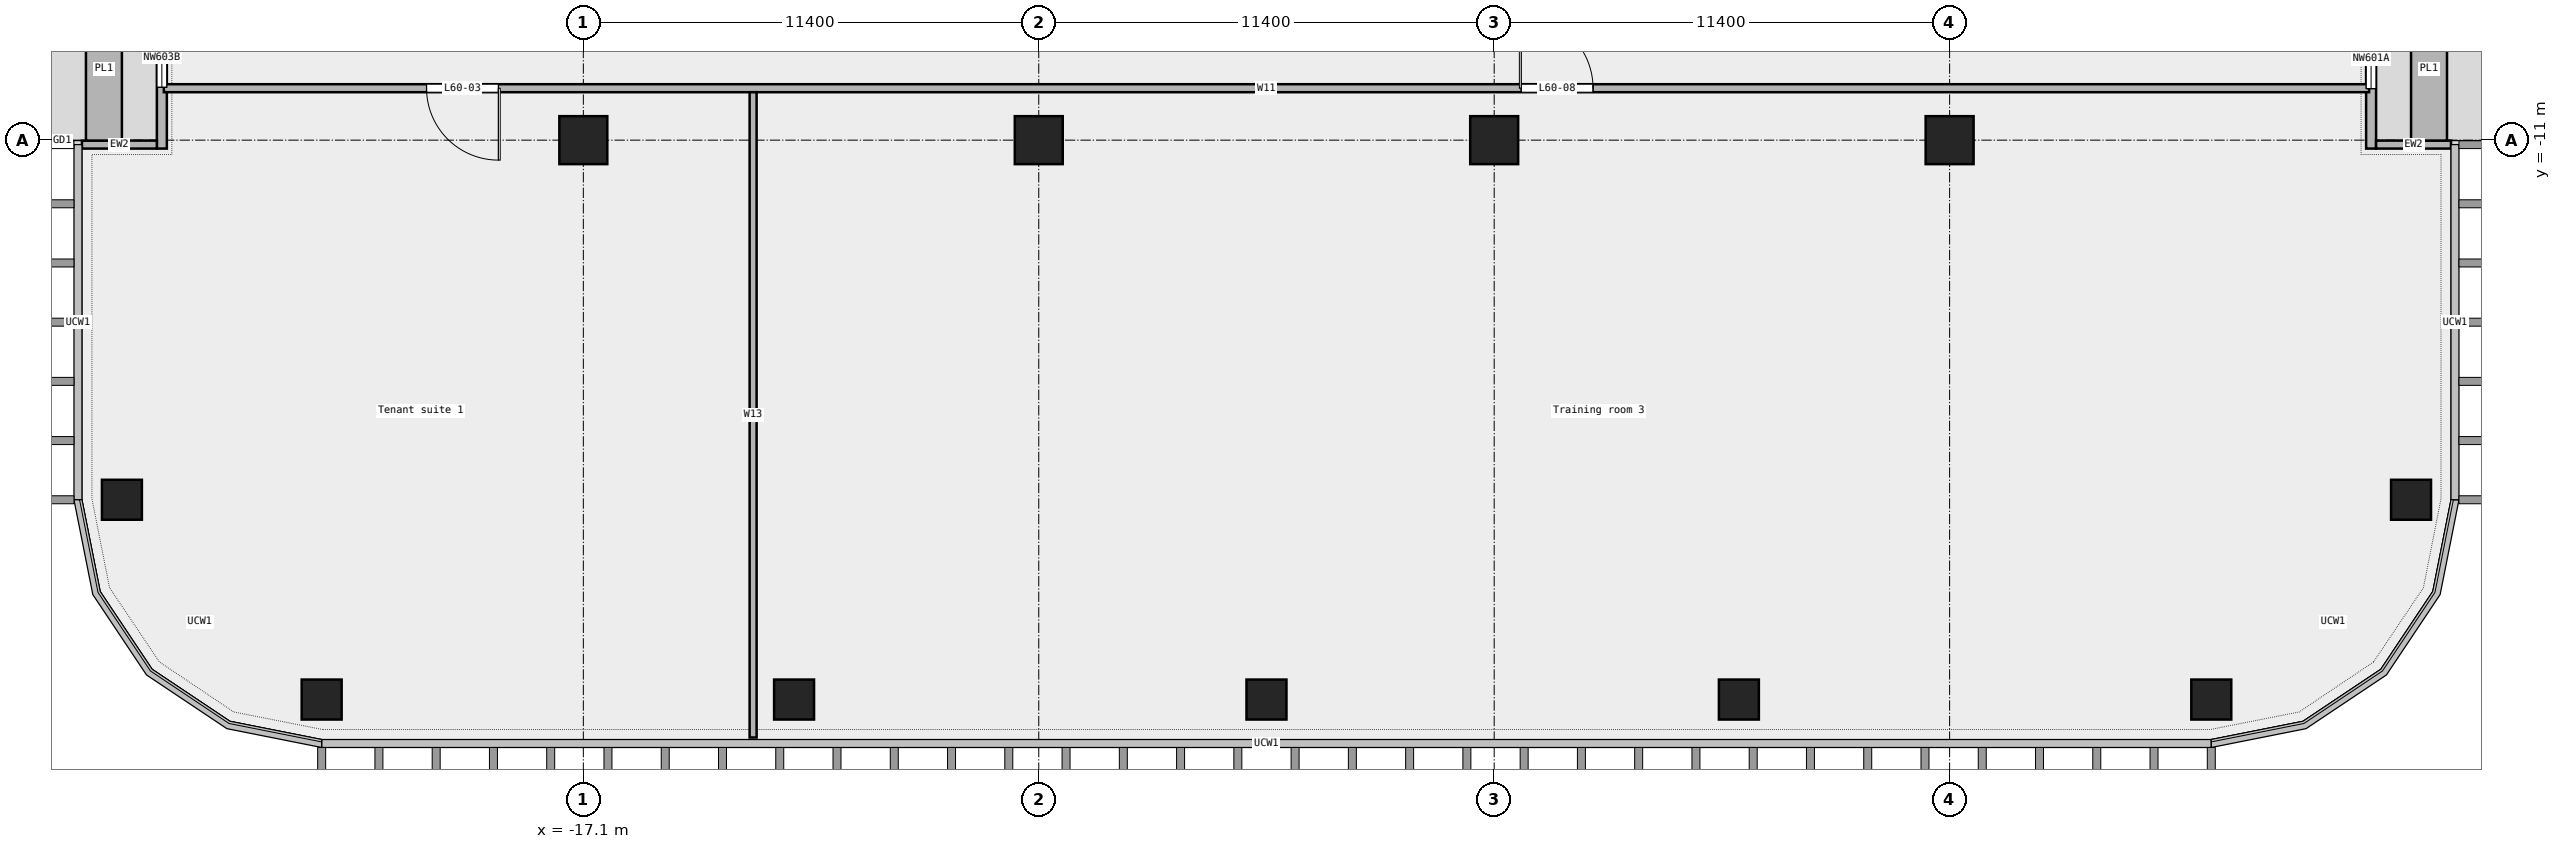
"""IFC4 building model, lengths in metres.
Left out: names, types, materials, properties, quantities, classifications, styles, units other than length and angle.
Written with IfcOpenShell. Run it as: python <this file> out.ifc"""

import sys

from ifc_helpers import new_model, si_unit, direction, frame, frame_2d, origin, origin_2d, place, context, subcontext, project, spatial, rectangle, extrude, element, fill, save


model = new_model("IFC4")
c1 = context("Model", 3, precision=1e-05, world=origin(), true_north=direction((0.0, 1.0)))
c2 = subcontext(c1, "Body", "Model", "MODEL_VIEW")
j1 = project(units=[si_unit("LENGTHUNIT", "METRE"), si_unit("PLANEANGLEUNIT", "RADIAN")], contexts=[c1])
p1 = place(None, origin())
s1 = spatial("IfcSite", under=j1, at=p1, CompositionType="ELEMENT")
p2 = place(p1, origin())
s2 = spatial("IfcBuilding", under=s1, at=p2, CompositionType="ELEMENT")
p3 = place(p2, frame((0.0, 0.0, 279.4)))
s3 = spatial("IfcBuildingStorey", under=s2, at=p3, CompositionType="ELEMENT", Elevation=279.4)
for number, where, z_axis, x_axis in (
    (1, (-23.65, -25.0, 0.0), (0.0, 0.0, 1.0), (1.0, 0.0, 0.0)),
    (2, (-11.825, -25.0, 0.0), (0.0, 0.0, 1.0), (1.0, 0.0, 0.0)),
    (3, (0.0, -25.0, 0.0), (0.0, 0.0, 1.0), (1.0, 0.0, 0.0)),
    (4, (11.825, -25.0, 0.0), (0.0, 0.0, 1.0), (1.0, 0.0, 0.0)),
    (5, (23.65, -25.0, 0.0), (0.0, 0.0, 1.0), (1.0, 0.0, 0.0)),
    (6, (28.65, -20.0, 0.0), (0.0, 0.0, 1.0), (1.0, 0.0, 0.0)),
    (7, (-28.65, -20.0, 0.0), (0.0, 0.0, 1.0), (1.0, 0.0, 0.0)),
):
    element("IfcColumn", number, at=place(p3, frame(where, z_axis=z_axis, x_axis=x_axis)), inside=s3, PredefinedType="COLUMN", context=c2, shape_type="SweptSolid", body=[
        extrude(rectangle(XDim=1.0, YDim=1.0, at=origin_2d()), origin(), (0.0, 0.0, 1.0), 3.6),
    ])
for number, where, z_axis, x_axis in (
    (8, (-17.1, -11.0, 0.0), (0.0, 0.0, 1.0), (1.0, 0.0, 0.0)),
    (9, (-5.7, -11.0, 0.0), (0.0, 0.0, 1.0), (1.0, 0.0, 0.0)),
    (10, (5.7, -11.0, 0.0), (0.0, 0.0, 1.0), (1.0, 0.0, 0.0)),
    (11, (17.1, -11.0, 0.0), (0.0, 0.0, 1.0), (1.0, 0.0, 0.0)),
):
    element("IfcColumn", number, at=place(p3, frame(where, z_axis=z_axis, x_axis=x_axis)), inside=s3, PredefinedType="COLUMN", context=c2, shape_type="SweptSolid", body=[
        extrude(rectangle(XDim=1.2, YDim=1.2, at=origin_2d()), origin(), (0.0, 0.0, 1.0), 3.6),
    ])
p4 = place(p3, frame((27.65, -11.211, 0.0), z_axis=(0.0, 0.0, 1.0), x_axis=(0.0, 1.0, 0.0)))
e12 = element("IfcWall", 12, at=p4, inside=s3, PredefinedType="STANDARD", context=c2, shape_type="SweptSolid", body=[
    extrude(rectangle(XDim=13.533, YDim=0.25, at=frame_2d((6.767, 0.0))), origin(), (0.0, 0.0, 1.0), 3.6),
])
p5 = place(p4, frame((1.5, 0.0, 0.45)))
e13 = element("IfcOpeningElement", 13, at=p5, cuts=e12, PredefinedType="OPENING", context=c2, shape_type="SweptSolid", body=[
    extrude(rectangle(XDim=1.5, YDim=2.4, at=frame_2d((0.75, 1.2))), frame((0.0, 0.137, 0.0), z_axis=(0.0, -1.0, 0.0), x_axis=(1.0, 0.0, 0.0)), (0.0, 0.0, 1.0), 0.274),
])
p6 = place(p4, frame((5.75, 0.0, 0.0)))
e14 = element("IfcOpeningElement", 14, at=p6, cuts=e12, PredefinedType="OPENING", context=c2, shape_type="SweptSolid", body=[
    extrude(rectangle(XDim=1.8, YDim=2.4, at=frame_2d((0.9, 1.2))), frame((0.0, 0.137, 0.0), z_axis=(0.0, -1.0, 0.0), x_axis=(1.0, 0.0, 0.0)), (0.0, 0.0, 1.0), 0.274),
])
p7 = place(p4, frame((10.5, 0.0, 0.45)))
e15 = element("IfcOpeningElement", 15, at=p7, cuts=e12, PredefinedType="OPENING", context=c2, shape_type="SweptSolid", body=[
    extrude(rectangle(XDim=1.5, YDim=2.4, at=frame_2d((0.75, 1.2))), frame((0.0, 0.137, 0.0), z_axis=(0.0, -1.0, 0.0), x_axis=(1.0, 0.0, 0.0)), (0.0, 0.0, 1.0), 0.274),
])
p8 = place(p3, frame((29.65, -11.111, 0.0), z_axis=(0.0, 0.0, 1.0), x_axis=(-1.0, 0.0, 0.0)))
e16 = element("IfcWall", 16, at=p8, inside=s3, PredefinedType="STANDARD", context=c2, shape_type="SweptSolid", body=[
    extrude(rectangle(XDim=1.875, YDim=0.2, at=frame_2d((0.938, 0.0))), origin(), (0.0, 0.0, 1.0), 3.6),
])
p9 = place(p3, frame((29.1, -11.011, 0.0), z_axis=(0.0, 0.0, 1.0), x_axis=(0.0, 1.0, 0.0)))
e17 = element("IfcWall", 17, at=p9, inside=s3, PredefinedType="STANDARD", context=c2, shape_type="SweptSolid", body=[
    extrude(rectangle(XDim=3.6, YDim=0.9, at=frame_2d((1.8, 0.0))), origin(), (0.0, 0.0, 1.0), 0.7),
])
p10 = place(p3, frame((-27.65, 2.322, 0.0), z_axis=(0.0, 0.0, 1.0), x_axis=(0.0, -1.0, 0.0)))
e18 = element("IfcWall", 18, at=p10, inside=s3, PredefinedType="STANDARD", context=c2, shape_type="SweptSolid", body=[
    extrude(rectangle(XDim=13.533, YDim=0.25, at=frame_2d((6.767, 0.0))), origin(), (0.0, 0.0, 1.0), 3.6),
])
p11 = place(p10, frame((1.5, 0.0, 0.45)))
e19 = element("IfcOpeningElement", 19, at=p11, cuts=e18, PredefinedType="OPENING", context=c2, shape_type="SweptSolid", body=[
    extrude(rectangle(XDim=1.5, YDim=2.4, at=frame_2d((0.75, 1.2))), frame((0.0, 0.137, 0.0), z_axis=(0.0, -1.0, 0.0), x_axis=(1.0, 0.0, 0.0)), (0.0, 0.0, 1.0), 0.274),
])
p12 = place(p10, frame((5.75, 0.0, 0.0)))
e20 = element("IfcOpeningElement", 20, at=p12, cuts=e18, PredefinedType="OPENING", context=c2, shape_type="SweptSolid", body=[
    extrude(rectangle(XDim=1.8, YDim=2.4, at=frame_2d((0.9, 1.2))), frame((0.0, 0.137, 0.0), z_axis=(0.0, -1.0, 0.0), x_axis=(1.0, 0.0, 0.0)), (0.0, 0.0, 1.0), 0.274),
])
p13 = place(p10, frame((10.5, 0.0, 0.45)))
e21 = element("IfcOpeningElement", 21, at=p13, cuts=e18, PredefinedType="OPENING", context=c2, shape_type="SweptSolid", body=[
    extrude(rectangle(XDim=1.5, YDim=2.4, at=frame_2d((0.75, 1.2))), frame((0.0, 0.137, 0.0), z_axis=(0.0, -1.0, 0.0), x_axis=(1.0, 0.0, 0.0)), (0.0, 0.0, 1.0), 0.274),
])
p14 = place(p3, frame((-29.65, -11.111, 0.0), z_axis=(0.0, 0.0, 1.0), x_axis=(1.0, 0.0, 0.0)))
e22 = element("IfcWall", 22, at=p14, inside=s3, PredefinedType="STANDARD", context=c2, shape_type="SweptSolid", body=[
    extrude(rectangle(XDim=1.875, YDim=0.2, at=frame_2d((0.938, 0.0))), origin(), (0.0, 0.0, 1.0), 3.6),
])
p15 = place(p3, frame((-29.1, -7.411, 0.0), z_axis=(0.0, 0.0, 1.0), x_axis=(0.0, -1.0, 0.0)))
e23 = element("IfcWall", 23, at=p15, inside=s3, PredefinedType="STANDARD", context=c2, shape_type="SweptSolid", body=[
    extrude(rectangle(XDim=3.6, YDim=0.9, at=frame_2d((1.8, 0.0))), origin(), (0.0, 0.0, 1.0), 0.7),
])
p16 = place(p3, frame((-27.6, -9.7, 0.0), z_axis=(0.0, 0.0, 1.0), x_axis=(1.0, 0.0, 0.0)))
e24 = element("IfcWall", 24, at=p16, inside=s3, PredefinedType="PARTITIONING", context=c2, shape_type="SweptSolid", body=[
    extrude(rectangle(XDim=55.2, YDim=0.2, at=frame_2d((27.6, 0.0))), origin(), (0.0, 0.0, 1.0), 3.6),
])
p17 = place(p16, frame((6.575, 0.0, 0.0)))
e25 = element("IfcOpeningElement", 25, at=p17, cuts=e24, PredefinedType="OPENING", context=c2, shape_type="SweptSolid", body=[
    extrude(rectangle(XDim=1.8, YDim=2.1, at=frame_2d((0.9, 1.05))), frame((0.0, 0.112, 0.0), z_axis=(0.0, -1.0, 0.0), x_axis=(1.0, 0.0, 0.0)), (0.0, 0.0, 1.0), 0.224),
])
p18 = place(p16, frame((33.975, 0.0, 0.0)))
e26 = element("IfcOpeningElement", 26, at=p18, cuts=e24, PredefinedType="OPENING", context=c2, shape_type="SweptSolid", body=[
    extrude(rectangle(XDim=1.8, YDim=2.1, at=frame_2d((0.9, 1.05))), frame((0.0, 0.112, 0.0), z_axis=(0.0, -1.0, 0.0), x_axis=(1.0, 0.0, 0.0)), (0.0, 0.0, 1.0), 0.224),
])
p19 = place(p3, frame((-12.85, -25.95, 0.0), z_axis=(0.0, 0.0, 1.0), x_axis=(0.0, 1.0, 0.0)))
e27 = element("IfcWall", 27, at=p19, inside=s3, PredefinedType="PARTITIONING", context=c2, shape_type="SweptSolid", body=[
    extrude(rectangle(XDim=16.15, YDim=0.175, at=frame_2d((8.075, 0.0))), origin(), (0.0, 0.0, 1.0), 3.6),
])
p20 = place(p5, origin())
e28 = element("IfcWindow", 28, at=p20, inside=s3, PartitioningType="SINGLE_PANEL", PredefinedType="WINDOW", context=c2, shape_type="SweptSolid", body=[
    extrude(rectangle(XDim=1.5, YDim=2.4, at=frame_2d((0.75, 1.2))), frame((0.0, 0.03, 0.0), z_axis=(0.0, -1.0, 0.0), x_axis=(1.0, 0.0, 0.0)), (0.0, 0.0, 1.0), 0.06),
])
fill(e13, e28)
p21 = place(p13, origin())
e29 = element("IfcWindow", 29, at=p21, inside=s3, PartitioningType="SINGLE_PANEL", PredefinedType="WINDOW", context=c2, shape_type="SweptSolid", body=[
    extrude(rectangle(XDim=1.5, YDim=2.4, at=frame_2d((0.75, 1.2))), frame((0.0, 0.03, 0.0), z_axis=(0.0, -1.0, 0.0), x_axis=(1.0, 0.0, 0.0)), (0.0, 0.0, 1.0), 0.06),
])
fill(e21, e29)
p22 = place(p17, origin())
e30 = element("IfcDoor", 30, at=p22, inside=s3, OperationType="DOUBLE_DOOR_SINGLE_SWING", PredefinedType="DOOR", context=c2, shape_type="SweptSolid", body=[
    extrude(rectangle(XDim=1.8, YDim=2.1, at=frame_2d((0.9, 1.05))), frame((0.0, 0.025, 0.0), z_axis=(0.0, -1.0, 0.0), x_axis=(1.0, 0.0, 0.0)), (0.0, 0.0, 1.0), 0.05),
])
fill(e25, e30)
p23 = place(p18, origin())
e31 = element("IfcDoor", 31, at=p23, inside=s3, OperationType="DOUBLE_DOOR_SINGLE_SWING", PredefinedType="DOOR", context=c2, shape_type="SweptSolid", body=[
    extrude(rectangle(XDim=1.8, YDim=2.1, at=frame_2d((0.9, 1.05))), frame((0.0, 0.025, 0.0), z_axis=(0.0, -1.0, 0.0), x_axis=(1.0, 0.0, 0.0)), (0.0, 0.0, 1.0), 0.05),
])
fill(e26, e31)
save(model, sys.argv[1])
